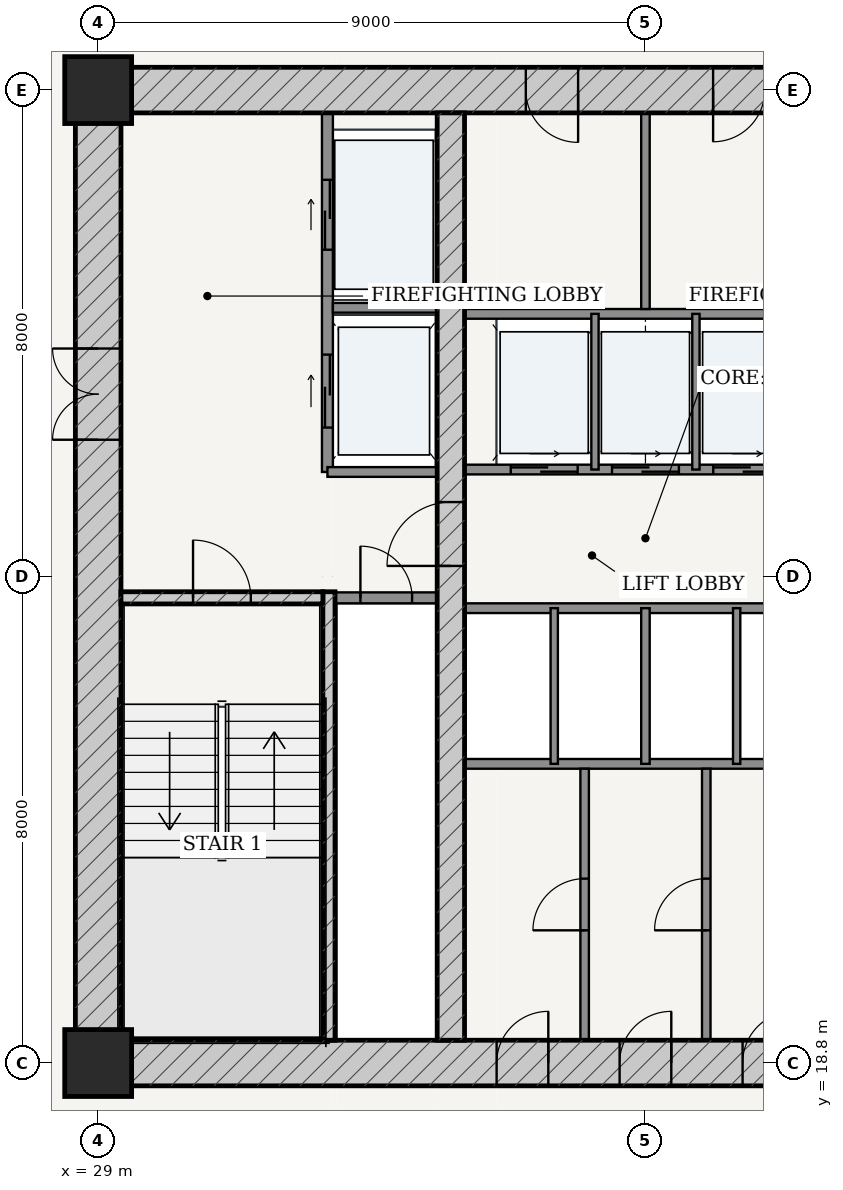
"""IFC4 building model, lengths in metres.
Left out: names, types, materials, properties, quantities, classifications, styles, units other than length and angle.
Written with IfcOpenShell. Run it as: python <this file> out.ifc"""

import sys

from ifc_helpers import new_model, si_unit, direction, frame, frame_2d, origin, origin_2d, place, context, subcontext, project, spatial, rectangle, extrude, source, transform, mapped, element, fill, save


model = new_model("IFC4")
c1 = context("Model", 3, precision=1e-05, world=origin(), true_north=direction((-0.2419218956, 0.970295726276)))
c2 = subcontext(c1, "Body", "Model", "MODEL_VIEW")
j1 = project(units=[si_unit("LENGTHUNIT", "METRE"), si_unit("PLANEANGLEUNIT", "RADIAN")], contexts=[c1])
p1 = place(None, origin())
s1 = spatial("IfcSite", under=j1, at=p1, CompositionType="ELEMENT")
p2 = place(p1, origin())
s2 = spatial("IfcBuilding", under=s1, at=p2, CompositionType="ELEMENT")
p3 = place(p2, frame((0.0, 0.0, 67.2)))
s3 = spatial("IfcBuildingStorey", under=s2, at=p3, CompositionType="ELEMENT", Elevation=67.2)
for number, where, z_axis, x_axis in (
    (1, (29.0, 18.8, 0.0), (0.0, 0.0, 1.0), (1.0, 0.0, 0.0)),
    (2, (29.0, 34.8, 0.0), (0.0, 0.0, 1.0), (1.0, 0.0, 0.0)),
):
    element("IfcColumn", number, at=place(p3, frame(where, z_axis=z_axis, x_axis=x_axis)), inside=s3, PredefinedType="COLUMN", context=c2, shape_type="SweptSolid", body=[
        extrude(rectangle(XDim=1.1, YDim=1.1, at=origin_2d()), origin(), (0.0, 0.0, 1.0), 3.6),
    ])
p4 = place(p3, frame((28.625, 18.8, 0.0), z_axis=(0.0, 0.0, 1.0), x_axis=(1.0, 0.0, 0.0)))
e3 = element("IfcWall", 3, at=p4, inside=s3, PredefinedType="SHEAR", context=c2, shape_type="SweptSolid", body=[
    extrude(rectangle(XDim=18.75, YDim=0.75, at=frame_2d((9.375, 0.0))), origin(), (0.0, 0.0, 1.0), 3.32),
])
p5 = place(p4, frame((6.927, 0.0, 0.0)))
e4 = element("IfcOpeningElement", 4, at=p5, cuts=e3, PredefinedType="OPENING", context=c2, shape_type="SweptSolid", body=[
    extrude(rectangle(XDim=0.85, YDim=2.1, at=frame_2d((0.425, 1.05))), frame((0.0, 0.385, 0.0), z_axis=(0.0, -1.0, 0.0), x_axis=(1.0, 0.0, 0.0)), (0.0, 0.0, 1.0), 0.77),
])
p6 = place(p4, frame((8.95, 0.0, 0.0)))
e5 = element("IfcOpeningElement", 5, at=p6, cuts=e3, PredefinedType="OPENING", context=c2, shape_type="SweptSolid", body=[
    extrude(rectangle(XDim=0.85, YDim=2.1, at=frame_2d((0.425, 1.05))), frame((0.0, 0.385, 0.0), z_axis=(0.0, -1.0, 0.0), x_axis=(1.0, 0.0, 0.0)), (0.0, 0.0, 1.0), 0.77),
])
p7 = place(p4, frame((10.972, 0.0, 0.0)))
e6 = element("IfcOpeningElement", 6, at=p7, cuts=e3, PredefinedType="OPENING", context=c2, shape_type="SweptSolid", body=[
    extrude(rectangle(XDim=0.85, YDim=2.1, at=frame_2d((0.425, 1.05))), frame((0.0, 0.385, 0.0), z_axis=(0.0, -1.0, 0.0), x_axis=(1.0, 0.0, 0.0)), (0.0, 0.0, 1.0), 0.77),
])
p8 = place(p3, frame((28.625, 34.8, 0.0), z_axis=(0.0, 0.0, 1.0), x_axis=(1.0, 0.0, 0.0)))
e7 = element("IfcWall", 7, at=p8, inside=s3, PredefinedType="SHEAR", context=c2, shape_type="SweptSolid", body=[
    extrude(rectangle(XDim=18.75, YDim=0.75, at=frame_2d((9.375, 0.0))), origin(), (0.0, 0.0, 1.0), 3.32),
])
p9 = place(p8, frame((7.407, 0.0, 0.0)))
e8 = element("IfcOpeningElement", 8, at=p9, cuts=e7, PredefinedType="OPENING", context=c2, shape_type="SweptSolid", body=[
    extrude(rectangle(XDim=0.86, YDim=2.1, at=frame_2d((0.43, 1.05))), frame((0.0, 0.385, 0.0), z_axis=(0.0, -1.0, 0.0), x_axis=(1.0, 0.0, 0.0)), (0.0, 0.0, 1.0), 0.77),
])
p10 = place(p8, frame((10.488, 0.0, 0.0)))
e9 = element("IfcOpeningElement", 9, at=p10, cuts=e7, PredefinedType="OPENING", context=c2, shape_type="SweptSolid", body=[
    extrude(rectangle(XDim=0.85, YDim=2.1, at=frame_2d((0.425, 1.05))), frame((0.0, 0.385, 0.0), z_axis=(0.0, -1.0, 0.0), x_axis=(1.0, 0.0, 0.0)), (0.0, 0.0, 1.0), 0.77),
])
p11 = place(p3, frame((29.0, 19.175, 0.0), z_axis=(0.0, 0.0, 1.0), x_axis=(0.0, 1.0, 0.0)))
e10 = element("IfcWall", 10, at=p11, inside=s3, PredefinedType="SHEAR", context=c2, shape_type="SweptSolid", body=[
    extrude(rectangle(XDim=15.25, YDim=0.75, at=frame_2d((7.625, 0.0))), origin(), (0.0, 0.0, 1.0), 3.32),
])
p12 = place(p11, frame((9.875, 0.0, 0.0)))
e11 = element("IfcOpeningElement", 11, at=p12, cuts=e10, PredefinedType="OPENING", context=c2, shape_type="SweptSolid", body=[
    extrude(rectangle(XDim=1.5, YDim=2.2, at=frame_2d((0.75, 1.1))), frame((0.0, 0.385, 0.0), z_axis=(0.0, -1.0, 0.0), x_axis=(1.0, 0.0, 0.0)), (0.0, 0.0, 1.0), 0.77),
])
p13 = place(p3, frame((32.795, 19.175, 0.0), z_axis=(0.0, 0.0, 1.0), x_axis=(0.0, 1.0, 0.0)))
e12 = element("IfcWall", 12, at=p13, inside=s3, PredefinedType="SOLIDWALL", context=c2, shape_type="SweptSolid", body=[
    extrude(rectangle(XDim=7.375, YDim=0.2, at=frame_2d((3.688, 0.0))), origin(), (0.0, 0.0, 1.0), 3.32),
])
p14 = place(p3, frame((29.375, 26.45, 0.0), z_axis=(0.0, 0.0, 1.0), x_axis=(1.0, 0.0, 0.0)))
e13 = element("IfcWall", 13, at=p14, inside=s3, PredefinedType="SOLIDWALL", context=c2, shape_type="SweptSolid", body=[
    extrude(rectangle(XDim=3.32, YDim=0.2, at=frame_2d((1.66, 0.0))), origin(), (0.0, 0.0, 1.0), 3.32),
])
p15 = place(p14, frame((1.185, 0.0, 0.0)))
e14 = element("IfcOpeningElement", 14, at=p15, cuts=e13, PredefinedType="OPENING", context=c2, shape_type="SweptSolid", body=[
    extrude(rectangle(XDim=0.95, YDim=2.15, at=frame_2d((0.475, 1.075))), frame((0.0, 0.11, 0.0), z_axis=(0.0, -1.0, 0.0), x_axis=(1.0, 0.0, 0.0)), (0.0, 0.0, 1.0), 0.22),
])
p16 = place(p3, frame((34.8, 19.175, 0.0), z_axis=(0.0, 0.0, 1.0), x_axis=(0.0, 1.0, 0.0)))
e15 = element("IfcWall", 15, at=p16, inside=s3, PredefinedType="SHEAR", context=c2, shape_type="SweptSolid", body=[
    extrude(rectangle(XDim=15.25, YDim=0.45, at=frame_2d((7.625, 0.0))), origin(), (0.0, 0.0, 1.0), 3.32),
])
p17 = place(p16, frame((7.8, 0.0, 0.0)))
e16 = element("IfcOpeningElement", 16, at=p17, cuts=e15, PredefinedType="OPENING", context=c2, shape_type="SweptSolid", body=[
    extrude(rectangle(XDim=1.05, YDim=2.15, at=frame_2d((0.525, 1.075))), frame((0.0, 0.235, 0.0), z_axis=(0.0, -1.0, 0.0), x_axis=(1.0, 0.0, 0.0)), (0.0, 0.0, 1.0), 0.47),
])
p18 = place(p3, frame((32.9, 26.45, 0.0), z_axis=(0.0, 0.0, 1.0), x_axis=(1.0, 0.0, 0.0)))
e17 = element("IfcWall", 17, at=p18, inside=s3, PredefinedType="PARTITIONING", context=c2, shape_type="SweptSolid", body=[
    extrude(rectangle(XDim=1.675, YDim=0.18, at=frame_2d((0.837, 0.0))), origin(), (0.0, 0.0, 1.0), 3.32),
])
p19 = place(p18, frame((0.413, 0.0, 0.0)))
e18 = element("IfcOpeningElement", 18, at=p19, cuts=e17, PredefinedType="OPENING", context=c2, shape_type="SweptSolid", body=[
    extrude(rectangle(XDim=0.85, YDim=2.1, at=frame_2d((0.425, 1.05))), frame((0.0, 0.1, 0.0), z_axis=(0.0, -1.0, 0.0), x_axis=(1.0, 0.0, 0.0)), (0.0, 0.0, 1.0), 0.2),
])
p20 = place(p3, frame((32.77, 28.52, 0.0), z_axis=(0.0, 0.0, 1.0), x_axis=(0.0, 1.0, 0.0)))
e19 = element("IfcWall", 19, at=p20, inside=s3, PredefinedType="PARTITIONING", context=c2, shape_type="SweptSolid", body=[
    extrude(rectangle(XDim=5.905, YDim=0.18, at=frame_2d((2.953, 0.0))), origin(), (0.0, 0.0, 1.0), 3.32),
])
p21 = place(p20, frame((3.655, 0.0, 0.0)))
e20 = element("IfcOpeningElement", 20, at=p21, cuts=e19, PredefinedType="OPENING", context=c2, shape_type="SweptSolid", body=[
    extrude(rectangle(XDim=1.15, YDim=2.2, at=frame_2d((0.575, 1.1))), frame((0.0, 0.1, 0.0), z_axis=(0.0, -1.0, 0.0), x_axis=(1.0, 0.0, 0.0)), (0.0, 0.0, 1.0), 0.2),
])
p22 = place(p20, frame((0.73, 0.0, 0.0)))
e21 = element("IfcOpeningElement", 21, at=p22, cuts=e19, PredefinedType="OPENING", context=c2, shape_type="SweptSolid", body=[
    extrude(rectangle(XDim=1.2, YDim=2.25, at=frame_2d((0.6, 1.125))), frame((0.0, 0.1, 0.0), z_axis=(0.0, -1.0, 0.0), x_axis=(1.0, 0.0, 0.0)), (0.0, 0.0, 1.0), 0.2),
])
p23 = place(p3, frame((32.86, 31.22, 0.0), z_axis=(0.0, 0.0, 1.0), x_axis=(1.0, 0.0, 0.0)))
e22 = element("IfcWall", 22, at=p23, inside=s3, PredefinedType="PARTITIONING", context=c2, shape_type="SweptSolid", body=[
    extrude(rectangle(XDim=1.715, YDim=0.16, at=frame_2d((0.857, 0.0))), origin(), (0.0, 0.0, 1.0), 3.32),
])
p24 = place(p3, frame((32.77, 28.52, 0.0), z_axis=(0.0, 0.0, 1.0), x_axis=(1.0, 0.0, 0.0)))
e23 = element("IfcWall", 23, at=p24, inside=s3, PredefinedType="PARTITIONING", context=c2, shape_type="SweptSolid", body=[
    extrude(rectangle(XDim=1.805, YDim=0.16, at=frame_2d((0.902, 0.0))), origin(), (0.0, 0.0, 1.0), 3.32),
])
p25 = place(p3, frame((35.025, 28.56, 0.0), z_axis=(0.0, 0.0, 1.0), x_axis=(1.0, 0.0, 0.0)))
e24 = element("IfcWall", 24, at=p25, inside=s3, PredefinedType="PARTITIONING", context=c2, shape_type="SweptSolid", body=[
    extrude(rectangle(XDim=5.95, YDim=0.16, at=frame_2d((2.975, 0.0))), origin(), (0.0, 0.0, 1.0), 3.32),
])
p26 = place(p25, frame((0.76, 0.0, 0.0)))
e25 = element("IfcOpeningElement", 25, at=p26, cuts=e24, PredefinedType="OPENING", context=c2, shape_type="SweptSolid", body=[
    extrude(rectangle(XDim=1.1, YDim=2.2, at=frame_2d((0.55, 1.1))), frame((0.0, 0.09, 0.0), z_axis=(0.0, -1.0, 0.0), x_axis=(1.0, 0.0, 0.0)), (0.0, 0.0, 1.0), 0.18),
])
p27 = place(p25, frame((2.425, 0.0, 0.0)))
e26 = element("IfcOpeningElement", 26, at=p27, cuts=e24, PredefinedType="OPENING", context=c2, shape_type="SweptSolid", body=[
    extrude(rectangle(XDim=1.1, YDim=2.2, at=frame_2d((0.55, 1.1))), frame((0.0, 0.09, 0.0), z_axis=(0.0, -1.0, 0.0), x_axis=(1.0, 0.0, 0.0)), (0.0, 0.0, 1.0), 0.18),
])
p28 = place(p25, frame((4.09, 0.0, 0.0)))
e27 = element("IfcOpeningElement", 27, at=p28, cuts=e24, PredefinedType="OPENING", context=c2, shape_type="SweptSolid", body=[
    extrude(rectangle(XDim=1.1, YDim=2.2, at=frame_2d((0.55, 1.1))), frame((0.0, 0.09, 0.0), z_axis=(0.0, -1.0, 0.0), x_axis=(1.0, 0.0, 0.0)), (0.0, 0.0, 1.0), 0.18),
])
p29 = place(p3, frame((35.025, 31.12, 0.0), z_axis=(0.0, 0.0, 1.0), x_axis=(1.0, 0.0, 0.0)))
e28 = element("IfcWall", 28, at=p29, inside=s3, PredefinedType="PARTITIONING", context=c2, shape_type="SweptSolid", body=[
    extrude(rectangle(XDim=5.95, YDim=0.16, at=frame_2d((2.975, 0.0))), origin(), (0.0, 0.0, 1.0), 3.32),
])
for number, where, z_axis, x_axis in (
    (29, (37.17, 28.56, 0.0), (0.0, 0.0, 1.0), (0.0, 1.0, 0.0)),
    (30, (38.83, 28.56, 0.0), (0.0, 0.0, 1.0), (0.0, 1.0, 0.0)),
):
    element("IfcWall", number, at=place(p3, frame(where, z_axis=z_axis, x_axis=x_axis)), inside=s3, PredefinedType="PARTITIONING", context=c2, shape_type="SweptSolid", body=[
        extrude(rectangle(XDim=2.56, YDim=0.12, at=frame_2d((1.28, 0.0))), origin(), (0.0, 0.0, 1.0), 3.32),
    ])
p30 = place(p3, frame((38.0, 31.2, 0.0), z_axis=(0.0, 0.0, 1.0), x_axis=(0.0, 1.0, 0.0)))
e31 = element("IfcWall", 31, at=p30, inside=s3, PredefinedType="PARTITIONING", context=c2, shape_type="SweptSolid", body=[
    extrude(rectangle(XDim=3.225, YDim=0.14, at=frame_2d((1.613, 0.0))), origin(), (0.0, 0.0, 1.0), 3.32),
])
for number, where, z_axis, x_axis in (
    (32, (35.025, 26.28, 0.0), (0.0, 0.0, 1.0), (1.0, 0.0, 0.0)),
    (33, (35.025, 23.72, 0.0), (0.0, 0.0, 1.0), (1.0, 0.0, 0.0)),
):
    element("IfcWall", number, at=place(p3, frame(where, z_axis=z_axis, x_axis=x_axis)), inside=s3, PredefinedType="PARTITIONING", context=c2, shape_type="SweptSolid", body=[
        extrude(rectangle(XDim=5.95, YDim=0.16, at=frame_2d((2.975, 0.0))), origin(), (0.0, 0.0, 1.0), 3.32),
    ])
p31 = place(p3, frame((36.5, 23.72, 0.0), z_axis=(0.0, 0.0, 1.0), x_axis=(0.0, 1.0, 0.0)))
e34 = element("IfcWall", 34, at=p31, inside=s3, PredefinedType="PARTITIONING", context=c2, shape_type="SweptSolid", body=[
    extrude(rectangle(XDim=2.56, YDim=0.12, at=frame_2d((1.28, 0.0))), origin(), (0.0, 0.0, 1.0), 3.32),
])
p32 = place(p3, frame((38.0, 23.72, 0.0), z_axis=(0.0, 0.0, 1.0), x_axis=(0.0, 1.0, 0.0)))
e35 = element("IfcWall", 35, at=p32, inside=s3, PredefinedType="PARTITIONING", context=c2, shape_type="SweptSolid", body=[
    extrude(rectangle(XDim=2.56, YDim=0.14, at=frame_2d((1.28, 0.0))), origin(), (0.0, 0.0, 1.0), 3.32),
])
p33 = place(p3, frame((39.5, 23.72, 0.0), z_axis=(0.0, 0.0, 1.0), x_axis=(0.0, 1.0, 0.0)))
e36 = element("IfcWall", 36, at=p33, inside=s3, PredefinedType="PARTITIONING", context=c2, shape_type="SweptSolid", body=[
    extrude(rectangle(XDim=2.56, YDim=0.12, at=frame_2d((1.28, 0.0))), origin(), (0.0, 0.0, 1.0), 3.32),
])
p34 = place(p3, frame((37.0, 19.175, 0.0), z_axis=(0.0, 0.0, 1.0), x_axis=(0.0, 1.0, 0.0)))
e37 = element("IfcWall", 37, at=p34, inside=s3, PredefinedType="PARTITIONING", context=c2, shape_type="SweptSolid", body=[
    extrude(rectangle(XDim=4.465, YDim=0.14, at=frame_2d((2.232, 0.0))), origin(), (0.0, 0.0, 1.0), 3.32),
])
p35 = place(p34, frame((1.808, 0.0, 0.0)))
e38 = element("IfcOpeningElement", 38, at=p35, cuts=e37, PredefinedType="OPENING", context=c2, shape_type="SweptSolid", body=[
    extrude(rectangle(XDim=0.85, YDim=2.1, at=frame_2d((0.425, 1.05))), frame((0.0, 0.08, 0.0), z_axis=(0.0, -1.0, 0.0), x_axis=(1.0, 0.0, 0.0)), (0.0, 0.0, 1.0), 0.16),
])
p36 = place(p3, frame((39.0, 19.175, 0.0), z_axis=(0.0, 0.0, 1.0), x_axis=(0.0, 1.0, 0.0)))
e39 = element("IfcWall", 39, at=p36, inside=s3, PredefinedType="PARTITIONING", context=c2, shape_type="SweptSolid", body=[
    extrude(rectangle(XDim=4.465, YDim=0.14, at=frame_2d((2.232, 0.0))), origin(), (0.0, 0.0, 1.0), 3.32),
])
p37 = place(p36, frame((1.808, 0.0, 0.0)))
e40 = element("IfcOpeningElement", 40, at=p37, cuts=e39, PredefinedType="OPENING", context=c2, shape_type="SweptSolid", body=[
    extrude(rectangle(XDim=0.85, YDim=2.1, at=frame_2d((0.425, 1.05))), frame((0.0, 0.08, 0.0), z_axis=(0.0, -1.0, 0.0), x_axis=(1.0, 0.0, 0.0)), (0.0, 0.0, 1.0), 0.16),
])
m1 = source(origin(), c2, "Body", "SweptSolid", [
    extrude(rectangle(XDim=1.5, YDim=2.2, at=frame_2d((0.75, 1.1))), frame((0.0, 0.025, 0.0), z_axis=(0.0, -1.0, 0.0), x_axis=(1.0, 0.0, 0.0)), (0.0, 0.0, 1.0), 0.05),
])
p38 = place(p12, origin())
e41 = element("IfcDoor", 41, at=p38, inside=s3, OperationType="DOUBLE_DOOR_SINGLE_SWING", PredefinedType="DOOR", context=c2, shape_type="MappedRepresentation", body=[
    mapped(m1, transform((0.0, 0.0, 0.0), scale=1.0)),
])
fill(e11, e41)
m2 = source(origin(), c2, "Body", "SweptSolid", [
    extrude(rectangle(XDim=1.05, YDim=2.15, at=frame_2d((0.525, 1.075))), frame((0.0, 0.025, 0.0), z_axis=(0.0, -1.0, 0.0), x_axis=(1.0, 0.0, 0.0)), (0.0, 0.0, 1.0), 0.05),
])
p39 = place(p17, origin())
e42 = element("IfcDoor", 42, at=p39, inside=s3, OperationType="SINGLE_SWING_LEFT", PredefinedType="DOOR", context=c2, shape_type="MappedRepresentation", body=[
    mapped(m2, transform((0.0, 0.0, 0.0), scale=1.0)),
])
fill(e16, e42)
m3 = source(origin(), c2, "Body", "SweptSolid", [
    extrude(rectangle(XDim=0.95, YDim=2.15, at=frame_2d((0.475, 1.075))), frame((0.0, 0.025, 0.0), z_axis=(0.0, -1.0, 0.0), x_axis=(1.0, 0.0, 0.0)), (0.0, 0.0, 1.0), 0.05),
])
p40 = place(p15, origin())
e43 = element("IfcDoor", 43, at=p40, inside=s3, OperationType="SINGLE_SWING_LEFT", PredefinedType="DOOR", context=c2, shape_type="MappedRepresentation", body=[
    mapped(m3, transform((0.0, 0.0, 0.0), scale=1.0)),
])
fill(e14, e43)
m4 = source(origin(), c2, "Body", "SweptSolid", [
    extrude(rectangle(XDim=0.85, YDim=2.1, at=frame_2d((0.425, 1.05))), frame((0.0, 0.025, 0.0), z_axis=(0.0, -1.0, 0.0), x_axis=(1.0, 0.0, 0.0)), (0.0, 0.0, 1.0), 0.05),
])
p41 = place(p19, origin())
e44 = element("IfcDoor", 44, at=p41, inside=s3, OperationType="SINGLE_SWING_LEFT", PredefinedType="DOOR", context=c2, shape_type="MappedRepresentation", body=[
    mapped(m4, transform((0.0, 0.0, 0.0), scale=1.0)),
])
fill(e18, e44)
m5 = source(origin(), c2, "Body", "SweptSolid", [
    extrude(rectangle(XDim=0.86, YDim=2.1, at=frame_2d((0.43, 1.05))), frame((0.0, 0.025, 0.0), z_axis=(0.0, -1.0, 0.0), x_axis=(1.0, 0.0, 0.0)), (0.0, 0.0, 1.0), 0.05),
])
p42 = place(p9, frame((0.86, 0.0, 0.0), z_axis=(0.0, 0.0, 1.0), x_axis=(-1.0, 0.0, 0.0)))
e45 = element("IfcDoor", 45, at=p42, inside=s3, OperationType="SINGLE_SWING_LEFT", PredefinedType="DOOR", context=c2, shape_type="MappedRepresentation", body=[
    mapped(m5, transform((0.0, 0.0, 0.0), scale=1.0)),
])
fill(e8, e45)
p43 = place(p10, frame((0.85, 0.0, 0.0), z_axis=(0.0, 0.0, 1.0), x_axis=(-1.0, 0.0, 0.0)))
e46 = element("IfcDoor", 46, at=p43, inside=s3, OperationType="SINGLE_SWING_RIGHT", PredefinedType="DOOR", context=c2, shape_type="MappedRepresentation", body=[
    mapped(m4, transform((0.0, 0.0, 0.0), scale=1.0)),
])
fill(e9, e46)
p44 = place(p5, origin())
e47 = element("IfcDoor", 47, at=p44, inside=s3, OperationType="SINGLE_SWING_RIGHT", PredefinedType="DOOR", context=c2, shape_type="MappedRepresentation", body=[
    mapped(m4, transform((0.0, 0.0, 0.0), scale=1.0)),
])
fill(e4, e47)
p45 = place(p6, origin())
e48 = element("IfcDoor", 48, at=p45, inside=s3, OperationType="SINGLE_SWING_RIGHT", PredefinedType="DOOR", context=c2, shape_type="MappedRepresentation", body=[
    mapped(m4, transform((0.0, 0.0, 0.0), scale=1.0)),
])
fill(e5, e48)
p46 = place(p7, origin())
e49 = element("IfcDoor", 49, at=p46, inside=s3, OperationType="SINGLE_SWING_RIGHT", PredefinedType="DOOR", context=c2, shape_type="MappedRepresentation", body=[
    mapped(m4, transform((0.0, 0.0, 0.0), scale=1.0)),
])
fill(e6, e49)
p47 = place(p35, origin())
e50 = element("IfcDoor", 50, at=p47, inside=s3, OperationType="SINGLE_SWING_LEFT", PredefinedType="DOOR", context=c2, shape_type="MappedRepresentation", body=[
    mapped(m4, transform((0.0, 0.0, 0.0), scale=1.0)),
])
fill(e38, e50)
p48 = place(p37, origin())
e51 = element("IfcDoor", 51, at=p48, inside=s3, OperationType="SINGLE_SWING_LEFT", PredefinedType="DOOR", context=c2, shape_type="MappedRepresentation", body=[
    mapped(m4, transform((0.0, 0.0, 0.0), scale=1.0)),
])
fill(e40, e51)
m6 = source(origin(), c2, "Body", "SweptSolid", [
    extrude(rectangle(XDim=1.15, YDim=2.2, at=frame_2d((0.575, 1.1))), frame((0.0, 0.025, 0.0), z_axis=(0.0, -1.0, 0.0), x_axis=(1.0, 0.0, 0.0)), (0.0, 0.0, 1.0), 0.05),
])
p49 = place(p21, origin())
e52 = element("IfcDoor", 52, at=p49, inside=s3, OperationType="DOUBLE_DOOR_SLIDING", PredefinedType="DOOR", context=c2, shape_type="MappedRepresentation", body=[
    mapped(m6, transform((0.0, 0.0, 0.0), scale=1.0)),
])
fill(e20, e52)
m7 = source(origin(), c2, "Body", "SweptSolid", [
    extrude(rectangle(XDim=1.2, YDim=2.25, at=frame_2d((0.6, 1.125))), frame((0.0, 0.025, 0.0), z_axis=(0.0, -1.0, 0.0), x_axis=(1.0, 0.0, 0.0)), (0.0, 0.0, 1.0), 0.05),
])
p50 = place(p22, origin())
e53 = element("IfcDoor", 53, at=p50, inside=s3, OperationType="DOUBLE_DOOR_SLIDING", PredefinedType="DOOR", context=c2, shape_type="MappedRepresentation", body=[
    mapped(m7, transform((0.0, 0.0, 0.0), scale=1.0)),
])
fill(e21, e53)
m8 = source(origin(), c2, "Body", "SweptSolid", [
    extrude(rectangle(XDim=1.1, YDim=2.2, at=frame_2d((0.55, 1.1))), frame((0.0, 0.025, 0.0), z_axis=(0.0, -1.0, 0.0), x_axis=(1.0, 0.0, 0.0)), (0.0, 0.0, 1.0), 0.05),
])
p51 = place(p26, origin())
e54 = element("IfcDoor", 54, at=p51, inside=s3, OperationType="DOUBLE_DOOR_SLIDING", PredefinedType="DOOR", context=c2, shape_type="MappedRepresentation", body=[
    mapped(m8, transform((0.0, 0.0, 0.0), scale=1.0)),
])
fill(e25, e54)
p52 = place(p27, origin())
e55 = element("IfcDoor", 55, at=p52, inside=s3, OperationType="DOUBLE_DOOR_SLIDING", PredefinedType="DOOR", context=c2, shape_type="MappedRepresentation", body=[
    mapped(m8, transform((0.0, 0.0, 0.0), scale=1.0)),
])
fill(e26, e55)
p53 = place(p28, origin())
e56 = element("IfcDoor", 56, at=p53, inside=s3, OperationType="DOUBLE_DOOR_SLIDING", PredefinedType="DOOR", context=c2, shape_type="MappedRepresentation", body=[
    mapped(m8, transform((0.0, 0.0, 0.0), scale=1.0)),
])
fill(e27, e56)
save(model, sys.argv[1])
